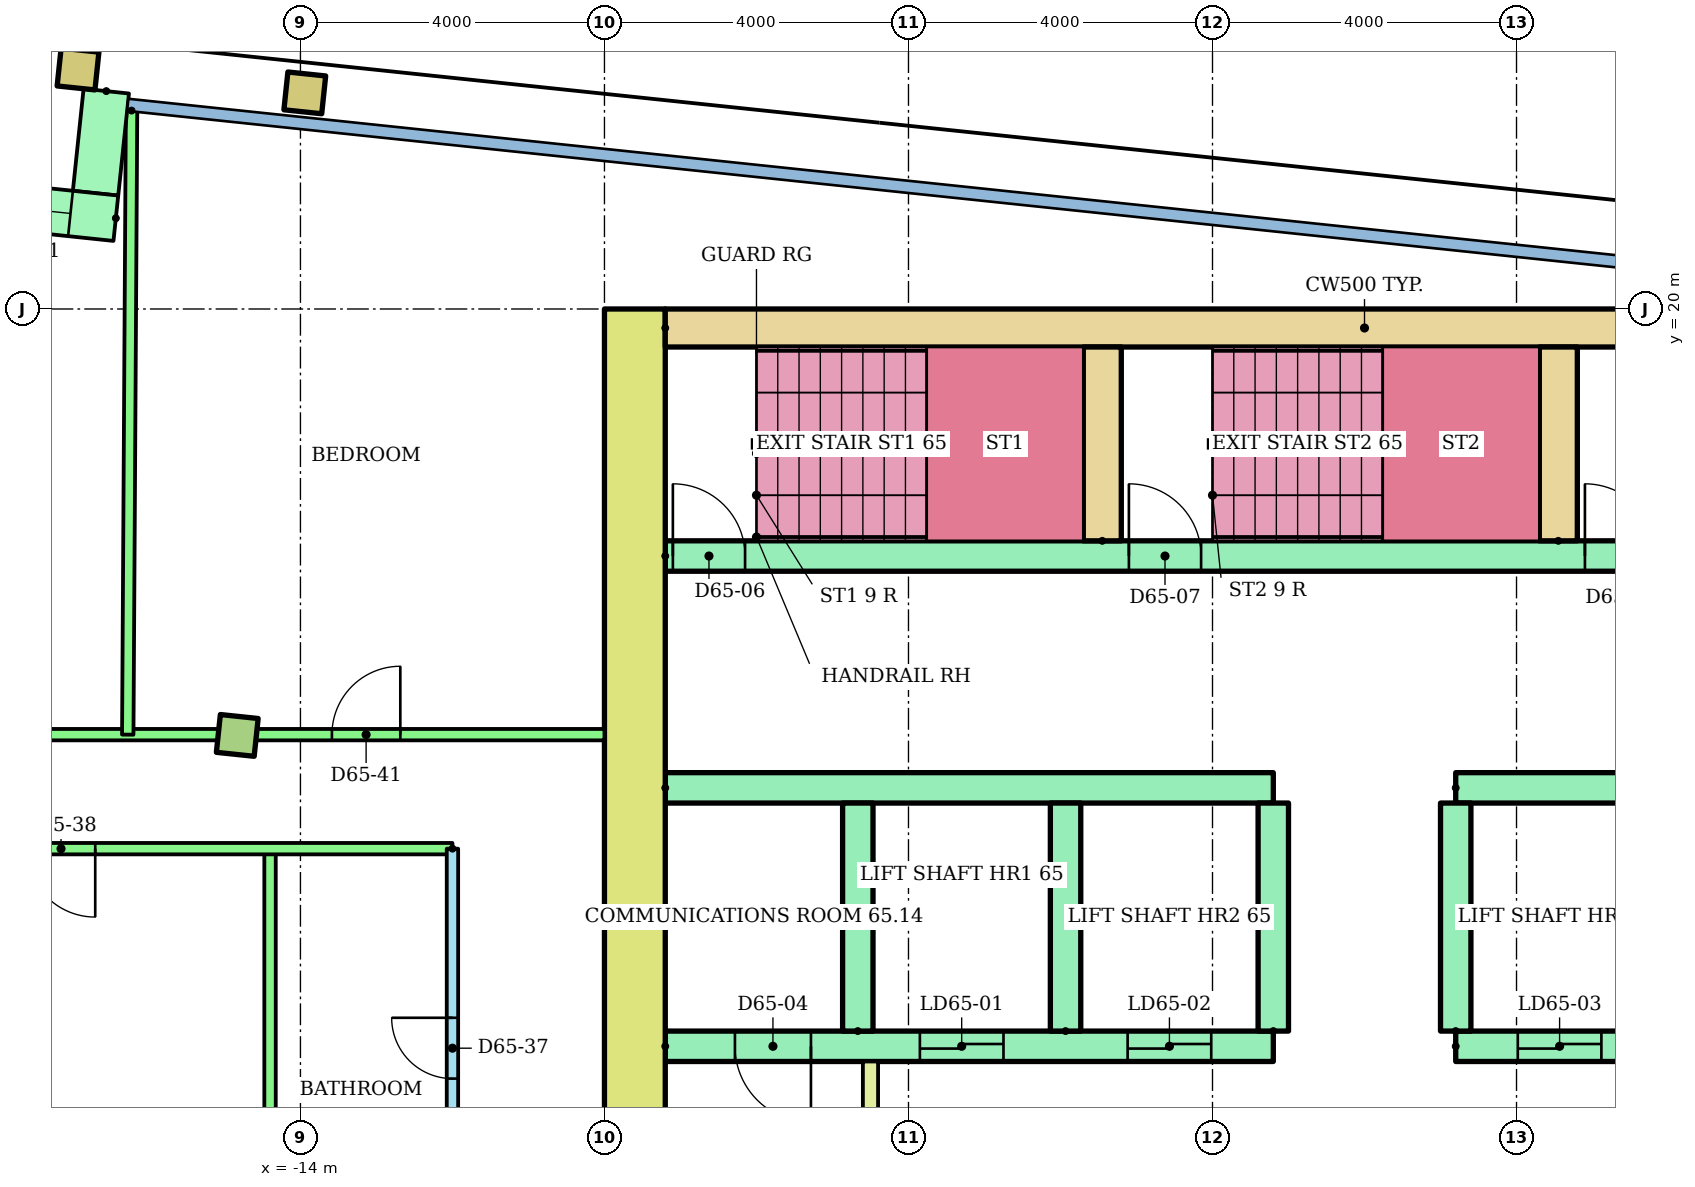
"""IFC4 building model, lengths in metres.
Left out: names, types, materials, properties, quantities, classifications, styles, units other than length and angle.
Written with IfcOpenShell. Run it as: python <this file> out.ifc"""

import sys

from ifc_helpers import new_model, si_unit, direction, frame, frame_2d, origin, origin_2d, place, context, subcontext, project, spatial, rectangle, hollow_rectangle, extrude, element, fill, save


model = new_model("IFC4")
c1 = context("Model", 3, precision=1e-05, world=origin(), true_north=direction((0.0, 1.0)))
c2 = subcontext(c1, "Body", "Model", "MODEL_VIEW")
j1 = project(units=[si_unit("LENGTHUNIT", "METRE"), si_unit("PLANEANGLEUNIT", "RADIAN")], contexts=[c1])
p1 = place(None, origin())
s1 = spatial("IfcSite", under=j1, at=p1, CompositionType="ELEMENT")
p2 = place(p1, origin())
s2 = spatial("IfcBuilding", under=s1, at=p2, CompositionType="ELEMENT")
p3 = place(p2, frame((0.0, 0.0, 253.1)))
s3 = spatial("IfcBuildingStorey", under=s2, at=p3, CompositionType="ELEMENT", Elevation=253.1)
p4 = place(p3, frame((-14.831, 14.39, 0.0), z_axis=(0.0, 0.0, 1.0), x_axis=(0.994521895368, -0.104528463268, 0.0)))
e1 = element("IfcColumn", 1, at=p4, inside=s3, PredefinedType="COLUMN", context=c2, shape_type="SweptSolid", body=[
    extrude(rectangle(XDim=0.5, YDim=0.5, at=origin_2d()), origin(), (0.0, 0.0, 1.0), 3.2),
])
for number, where, z_axis, x_axis in (
    (2, (-16.926, 23.157, 0.0), (0.0, 0.0, 1.0), (0.995, -0.105, 0.0)),
    (3, (-13.943, 22.843, 0.0), (0.0, 0.0, 1.0), (0.995, -0.105, 0.0)),
):
    element("IfcColumn", number, at=place(p3, frame(where, z_axis=z_axis, x_axis=x_axis)), inside=s3, PredefinedType="COLUMN", context=c2, shape_type="SweptSolid", body=[
        extrude(hollow_rectangle(XDim=0.5, YDim=0.5, WallThickness=0.025, at=origin_2d()), origin(), (0.0, 0.0, 1.0), 3.2),
    ])
p5 = place(p3, frame((-16.555, 22.866, 0.0), z_axis=(0.0, 0.0, 1.0), x_axis=(-0.104515354875, -0.994523273029, 0.0)))
e4 = element("IfcWall", 4, at=p5, inside=s3, PredefinedType="STANDARD", context=c2, shape_type="SweptSolid", body=[
    extrude(rectangle(XDim=1.35, YDim=0.6, at=frame_2d((0.675, 0.0))), origin(), (0.0, 0.0, 1.0), 2.92),
])
p6 = place(p3, frame((-16.429, 21.194, 0.0), z_axis=(0.0, 0.0, 1.0), x_axis=(-0.994522640205, 0.104521376379, 0.0)))
e5 = element("IfcWall", 5, at=p6, inside=s3, PredefinedType="STANDARD", context=c2, shape_type="SweptSolid", body=[
    extrude(rectangle(XDim=2.1, YDim=0.6, at=frame_2d((1.05, 0.0))), origin(), (0.0, 0.0, 1.0), 2.92),
])
p7 = place(p6, frame((0.6, 0.0, 0.9)))
e6 = element("IfcOpeningElement", 6, at=p7, cuts=e5, PredefinedType="OPENING", context=c2, shape_type="SweptSolid", body=[
    extrude(rectangle(XDim=0.9, YDim=1.5, at=frame_2d((0.45, 0.75))), frame((0.0, 0.31, 0.0), z_axis=(0.0, -1.0, 0.0), x_axis=(1.0, 0.0, 0.0)), (0.0, 0.0, 1.0), 0.62),
])
p8 = place(p3, frame((-9.6, 6.4, 0.0), z_axis=(0.0, 0.0, 1.0), x_axis=(0.0, 1.0, 0.0)))
e7 = element("IfcWall", 7, at=p8, inside=s3, PredefinedType="SHEAR", context=c2, shape_type="SweptSolid", body=[
    extrude(rectangle(XDim=13.6, YDim=0.8, at=frame_2d((6.8, 0.0))), origin(), (0.0, 0.0, 1.0), 2.92),
])
p9 = place(p3, frame((-9.2, 19.75, 0.0)))
e8 = element("IfcWall", 8, at=p9, inside=s3, PredefinedType="SHEAR", context=c2, shape_type="SweptSolid", body=[
    extrude(rectangle(XDim=18.4, YDim=0.5, at=frame_2d((9.2, 0.0))), origin(), (0.0, 0.0, 1.0), 2.92),
])
p10 = place(p3, frame((-9.2, 10.3, 0.0)))
e9 = element("IfcWall", 9, at=p10, inside=s3, PredefinedType="SHEAR", context=c2, shape_type="SweptSolid", body=[
    extrude(rectangle(XDim=8.0, YDim=0.4, at=frame_2d((4.0, 0.0))), origin(), (0.0, 0.0, 1.0), 2.92),
])
p11 = place(p10, frame((3.35, 0.0, 0.0)))
e10 = element("IfcOpeningElement", 10, at=p11, cuts=e9, PredefinedType="OPENING", context=c2, shape_type="SweptSolid", body=[
    extrude(rectangle(XDim=1.1, YDim=2.1, at=frame_2d((0.55, 1.05))), frame((0.0, 0.21, 0.0), z_axis=(0.0, -1.0, 0.0), x_axis=(1.0, 0.0, 0.0)), (0.0, 0.0, 1.0), 0.42),
])
p12 = place(p10, frame((6.083, 0.0, 0.0)))
e11 = element("IfcOpeningElement", 11, at=p12, cuts=e9, PredefinedType="OPENING", context=c2, shape_type="SweptSolid", body=[
    extrude(rectangle(XDim=1.1, YDim=2.1, at=frame_2d((0.55, 1.05))), frame((0.0, 0.21, 0.0), z_axis=(0.0, -1.0, 0.0), x_axis=(1.0, 0.0, 0.0)), (0.0, 0.0, 1.0), 0.42),
])
p13 = place(p10, frame((0.917, 0.0, 0.0)))
e12 = element("IfcOpeningElement", 12, at=p13, cuts=e9, PredefinedType="OPENING", context=c2, shape_type="SweptSolid", body=[
    extrude(rectangle(XDim=1.0, YDim=2.1, at=frame_2d((0.5, 1.05))), frame((0.0, 0.21, 0.0), z_axis=(0.0, -1.0, 0.0), x_axis=(1.0, 0.0, 0.0)), (0.0, 0.0, 1.0), 0.42),
])
p14 = place(p3, frame((-9.2, 13.7, 0.0)))
e13 = element("IfcWall", 13, at=p14, inside=s3, PredefinedType="SHEAR", context=c2, shape_type="SweptSolid", body=[
    extrude(rectangle(XDim=8.0, YDim=0.4, at=frame_2d((4.0, 0.0))), origin(), (0.0, 0.0, 1.0), 2.92),
])
p15 = place(p3, frame((1.2, 10.3, 0.0)))
e14 = element("IfcWall", 14, at=p15, inside=s3, PredefinedType="SHEAR", context=c2, shape_type="SweptSolid", body=[
    extrude(rectangle(XDim=8.0, YDim=0.4, at=frame_2d((4.0, 0.0))), origin(), (0.0, 0.0, 1.0), 2.92),
])
p16 = place(p15, frame((0.817, 0.0, 0.0)))
e15 = element("IfcOpeningElement", 15, at=p16, cuts=e14, PredefinedType="OPENING", context=c2, shape_type="SweptSolid", body=[
    extrude(rectangle(XDim=1.1, YDim=2.1, at=frame_2d((0.55, 1.05))), frame((0.0, 0.21, 0.0), z_axis=(0.0, -1.0, 0.0), x_axis=(1.0, 0.0, 0.0)), (0.0, 0.0, 1.0), 0.42),
])
p17 = place(p15, frame((3.55, 0.0, 0.0)))
e16 = element("IfcOpeningElement", 16, at=p17, cuts=e14, PredefinedType="OPENING", context=c2, shape_type="SweptSolid", body=[
    extrude(rectangle(XDim=1.1, YDim=2.1, at=frame_2d((0.55, 1.05))), frame((0.0, 0.21, 0.0), z_axis=(0.0, -1.0, 0.0), x_axis=(1.0, 0.0, 0.0)), (0.0, 0.0, 1.0), 0.42),
])
p18 = place(p15, frame((6.283, 0.0, 0.0)))
e17 = element("IfcOpeningElement", 17, at=p18, cuts=e14, PredefinedType="OPENING", context=c2, shape_type="SweptSolid", body=[
    extrude(rectangle(XDim=1.1, YDim=2.1, at=frame_2d((0.55, 1.05))), frame((0.0, 0.21, 0.0), z_axis=(0.0, -1.0, 0.0), x_axis=(1.0, 0.0, 0.0)), (0.0, 0.0, 1.0), 0.42),
])
p19 = place(p3, frame((1.2, 13.7, 0.0)))
e18 = element("IfcWall", 18, at=p19, inside=s3, PredefinedType="SHEAR", context=c2, shape_type="SweptSolid", body=[
    extrude(rectangle(XDim=8.0, YDim=0.4, at=frame_2d((4.0, 0.0))), origin(), (0.0, 0.0, 1.0), 2.92),
])
for number, where, z_axis, x_axis in (
    (19, (-6.667, 10.5, 0.0), (0.0, 0.0, 1.0), (0.0, 1.0, 0.0)),
    (20, (-3.933, 10.5, 0.0), (0.0, 0.0, 1.0), (0.0, 1.0, 0.0)),
    (21, (-1.2, 10.5, 0.0), (0.0, 0.0, 1.0), (0.0, 1.0, 0.0)),
    (22, (1.2, 10.5, 0.0), (0.0, 0.0, 1.0), (0.0, 1.0, 0.0)),
):
    element("IfcWall", number, at=place(p3, frame(where, z_axis=z_axis, x_axis=x_axis)), inside=s3, PredefinedType="SHEAR", context=c2, shape_type="SweptSolid", body=[
        extrude(rectangle(XDim=3.0, YDim=0.4, at=frame_2d((1.5, 0.0))), origin(), (0.0, 0.0, 1.0), 2.92),
    ])
p20 = place(p3, frame((-9.2, 16.75, 0.0)))
e23 = element("IfcWall", 23, at=p20, inside=s3, PredefinedType="SHEAR", context=c2, shape_type="SweptSolid", body=[
    extrude(rectangle(XDim=18.4, YDim=0.4, at=frame_2d((9.2, 0.0))), origin(), (0.0, 0.0, 1.0), 2.92),
])
p21 = place(p20, frame((0.1, 0.0, 0.0)))
e24 = element("IfcOpeningElement", 24, at=p21, cuts=e23, PredefinedType="OPENING", context=c2, shape_type="SweptSolid", body=[
    extrude(rectangle(XDim=0.95, YDim=2.1, at=frame_2d((0.475, 1.05))), frame((0.0, 0.21, 0.0), z_axis=(0.0, -1.0, 0.0), x_axis=(1.0, 0.0, 0.0)), (0.0, 0.0, 1.0), 0.42),
])
p22 = place(p20, frame((6.1, 0.0, 0.0)))
e25 = element("IfcOpeningElement", 25, at=p22, cuts=e23, PredefinedType="OPENING", context=c2, shape_type="SweptSolid", body=[
    extrude(rectangle(XDim=0.95, YDim=2.1, at=frame_2d((0.475, 1.05))), frame((0.0, 0.21, 0.0), z_axis=(0.0, -1.0, 0.0), x_axis=(1.0, 0.0, 0.0)), (0.0, 0.0, 1.0), 0.42),
])
p23 = place(p20, frame((12.1, 0.0, 0.0)))
e26 = element("IfcOpeningElement", 26, at=p23, cuts=e23, PredefinedType="OPENING", context=c2, shape_type="SweptSolid", body=[
    extrude(rectangle(XDim=0.95, YDim=2.1, at=frame_2d((0.475, 1.05))), frame((0.0, 0.21, 0.0), z_axis=(0.0, -1.0, 0.0), x_axis=(1.0, 0.0, 0.0)), (0.0, 0.0, 1.0), 0.42),
])
for number, where, z_axis, x_axis in (
    (27, (-3.45, 16.95, 0.0), (0.0, 0.0, 1.0), (0.0, 1.0, 0.0)),
    (28, (2.55, 16.95, 0.0), (0.0, 0.0, 1.0), (0.0, 1.0, 0.0)),
):
    element("IfcWall", number, at=place(p3, frame(where, z_axis=z_axis, x_axis=x_axis)), inside=s3, PredefinedType="SHEAR", context=c2, shape_type="SweptSolid", body=[
        extrude(rectangle(XDim=2.55, YDim=0.5, at=frame_2d((1.275, 0.0))), origin(), (0.0, 0.0, 1.0), 2.92),
    ])
p24 = place(p3, frame((-6.5, 6.8, 0.0), z_axis=(0.0, 0.0, 1.0), x_axis=(0.0, 1.0, 0.0)))
e29 = element("IfcWall", 29, at=p24, inside=s3, PredefinedType="PARTITIONING", context=c2, shape_type="SweptSolid", body=[
    extrude(rectangle(XDim=3.3, YDim=0.2, at=frame_2d((1.65, 0.0))), origin(), (0.0, 0.0, 1.0), 2.92),
])
p25 = place(p24, frame((1.15, 0.0, 0.0)))
e30 = element("IfcOpeningElement", 30, at=p25, cuts=e29, PredefinedType="OPENING", context=c2, shape_type="SweptSolid", body=[
    extrude(rectangle(XDim=1.0, YDim=2.1, at=frame_2d((0.5, 1.05))), frame((0.0, 0.11, 0.0), z_axis=(0.0, -1.0, 0.0), x_axis=(1.0, 0.0, 0.0)), (0.0, 0.0, 1.0), 0.22),
])
p26 = place(p3, frame((-12.0, 1.4, 0.0), z_axis=(0.0, 0.0, 1.0), x_axis=(0.0, 1.0, 0.0)))
e31 = element("IfcWall", 31, at=p26, inside=s3, PredefinedType="PARTITIONING", context=c2, shape_type="SweptSolid", body=[
    extrude(rectangle(XDim=11.5, YDim=0.15, at=frame_2d((5.75, 0.0))), origin(), (0.0, 0.0, 1.0), 2.4),
])
p27 = place(p26, frame((2.675, 0.0, 0.0)))
e32 = element("IfcOpeningElement", 32, at=p27, cuts=e31, PredefinedType="OPENING", context=c2, shape_type="SweptSolid", body=[
    extrude(rectangle(XDim=0.9, YDim=2.1, at=frame_2d((0.45, 1.05))), frame((0.0, 0.085, 0.0), z_axis=(0.0, -1.0, 0.0), x_axis=(1.0, 0.0, 0.0)), (0.0, 0.0, 1.0), 0.17),
])
p28 = place(p26, frame((8.475, 0.0, 0.0)))
e33 = element("IfcOpeningElement", 33, at=p28, cuts=e31, PredefinedType="OPENING", context=c2, shape_type="SweptSolid", body=[
    extrude(rectangle(XDim=0.8, YDim=2.1, at=frame_2d((0.4, 1.05))), frame((0.0, 0.085, 0.0), z_axis=(0.0, -1.0, 0.0), x_axis=(1.0, 0.0, 0.0)), (0.0, 0.0, 1.0), 0.17),
])
p29 = place(p3, frame((-14.4, 1.4, 0.0), z_axis=(0.0, 0.0, 1.0), x_axis=(0.0, 1.0, 0.0)))
e34 = element("IfcWall", 34, at=p29, inside=s3, PredefinedType="PARTITIONING", context=c2, shape_type="SweptSolid", body=[
    extrude(rectangle(XDim=11.5, YDim=0.15, at=frame_2d((5.75, 0.0))), origin(), (0.0, 0.0, 1.0), 2.4),
])
p30 = place(p3, frame((-12.0, 12.9, 0.0), z_axis=(0.0, 0.0, 1.0), x_axis=(-1.0, 0.0, 0.0)))
e35 = element("IfcWall", 35, at=p30, inside=s3, PredefinedType="PARTITIONING", context=c2, shape_type="SweptSolid", body=[
    extrude(rectangle(XDim=10.047, YDim=0.15, at=frame_2d((5.024, 0.0))), origin(), (0.0, 0.0, 1.0), 2.4),
])
p31 = place(p30, frame((4.7, 0.0, 0.0)))
e36 = element("IfcOpeningElement", 36, at=p31, cuts=e35, PredefinedType="OPENING", context=c2, shape_type="SweptSolid", body=[
    extrude(rectangle(XDim=0.9, YDim=2.1, at=frame_2d((0.45, 1.05))), frame((0.0, 0.085, 0.0), z_axis=(0.0, -1.0, 0.0), x_axis=(1.0, 0.0, 0.0)), (0.0, 0.0, 1.0), 0.17),
])
p32 = place(p30, frame((9.047, 0.0, 0.0)))
e37 = element("IfcOpeningElement", 37, at=p32, cuts=e35, PredefinedType="OPENING", context=c2, shape_type="SweptSolid", body=[
    extrude(rectangle(XDim=0.9, YDim=2.1, at=frame_2d((0.45, 1.05))), frame((0.0, 0.085, 0.0), z_axis=(0.0, -1.0, 0.0), x_axis=(1.0, 0.0, 0.0)), (0.0, 0.0, 1.0), 0.17),
])
p33 = place(p3, frame((-21.89, 14.4, 0.0)))
e38 = element("IfcWall", 38, at=p33, inside=s3, PredefinedType="PARTITIONING", context=c2, shape_type="SweptSolid", body=[
    extrude(rectangle(XDim=11.89, YDim=0.15, at=frame_2d((5.945, 0.0))), origin(), (0.0, 0.0, 1.0), 2.4),
])
p34 = place(p33, frame((1.26, 0.0, 0.0)))
e39 = element("IfcOpeningElement", 39, at=p34, cuts=e38, PredefinedType="OPENING", context=c2, shape_type="SweptSolid", body=[
    extrude(rectangle(XDim=1.0, YDim=2.1, at=frame_2d((0.5, 1.05))), frame((0.0, 0.085, 0.0), z_axis=(0.0, -1.0, 0.0), x_axis=(1.0, 0.0, 0.0)), (0.0, 0.0, 1.0), 0.17),
])
p35 = place(p33, frame((8.304, 0.0, 0.0)))
e40 = element("IfcOpeningElement", 40, at=p35, cuts=e38, PredefinedType="OPENING", context=c2, shape_type="SweptSolid", body=[
    extrude(rectangle(XDim=0.9, YDim=2.1, at=frame_2d((0.45, 1.05))), frame((0.0, 0.085, 0.0), z_axis=(0.0, -1.0, 0.0), x_axis=(1.0, 0.0, 0.0)), (0.0, 0.0, 1.0), 0.17),
])
p36 = place(p3, frame((-16.222, 22.61, 0.0), z_axis=(0.0, 0.0, 1.0), x_axis=(-0.006095634594, -0.999981421447, 0.0)))
e41 = element("IfcWall", 41, at=p36, inside=s3, PredefinedType="PARTITIONING", context=c2, shape_type="SweptSolid", body=[
    extrude(rectangle(XDim=8.211, YDim=0.15, at=frame_2d((4.105, 0.0))), origin(), (0.0, 0.0, 1.0), 2.4),
])
p37 = place(p7, origin())
e42 = element("IfcWindow", 42, at=p37, inside=s3, PartitioningType="SINGLE_PANEL", PredefinedType="WINDOW", context=c2, shape_type="SweptSolid", body=[
    extrude(rectangle(XDim=0.9, YDim=1.5, at=frame_2d((0.45, 0.75))), frame((0.0, 0.03, 0.0), z_axis=(0.0, -1.0, 0.0), x_axis=(1.0, 0.0, 0.0)), (0.0, 0.0, 1.0), 0.06),
])
fill(e6, e42)
p38 = place(p11, origin())
e43 = element("IfcDoor", 43, at=p38, inside=s3, OperationType="SLIDING_TO_LEFT", PredefinedType="DOOR", context=c2, shape_type="SweptSolid", body=[
    extrude(rectangle(XDim=1.1, YDim=2.1, at=frame_2d((0.55, 1.05))), frame((0.0, 0.025, 0.0), z_axis=(0.0, -1.0, 0.0), x_axis=(1.0, 0.0, 0.0)), (0.0, 0.0, 1.0), 0.05),
])
fill(e10, e43)
p39 = place(p12, origin())
e44 = element("IfcDoor", 44, at=p39, inside=s3, OperationType="SLIDING_TO_LEFT", PredefinedType="DOOR", context=c2, shape_type="SweptSolid", body=[
    extrude(rectangle(XDim=1.1, YDim=2.1, at=frame_2d((0.55, 1.05))), frame((0.0, 0.025, 0.0), z_axis=(0.0, -1.0, 0.0), x_axis=(1.0, 0.0, 0.0)), (0.0, 0.0, 1.0), 0.05),
])
fill(e11, e44)
p40 = place(p16, origin())
e45 = element("IfcDoor", 45, at=p40, inside=s3, OperationType="SLIDING_TO_LEFT", PredefinedType="DOOR", context=c2, shape_type="SweptSolid", body=[
    extrude(rectangle(XDim=1.1, YDim=2.1, at=frame_2d((0.55, 1.05))), frame((0.0, 0.025, 0.0), z_axis=(0.0, -1.0, 0.0), x_axis=(1.0, 0.0, 0.0)), (0.0, 0.0, 1.0), 0.05),
])
fill(e15, e45)
p41 = place(p13, frame((1.0, 0.0, 0.0), z_axis=(0.0, 0.0, 1.0), x_axis=(-1.0, 0.0, 0.0)))
e46 = element("IfcDoor", 46, at=p41, inside=s3, OperationType="SINGLE_SWING_RIGHT", PredefinedType="DOOR", context=c2, shape_type="SweptSolid", body=[
    extrude(rectangle(XDim=1.0, YDim=2.1, at=frame_2d((0.5, 1.05))), frame((0.0, 0.025, 0.0), z_axis=(0.0, -1.0, 0.0), x_axis=(1.0, 0.0, 0.0)), (0.0, 0.0, 1.0), 0.05),
])
fill(e12, e46)
p42 = place(p21, origin())
e47 = element("IfcDoor", 47, at=p42, inside=s3, OperationType="SINGLE_SWING_LEFT", PredefinedType="DOOR", context=c2, shape_type="SweptSolid", body=[
    extrude(rectangle(XDim=0.95, YDim=2.1, at=frame_2d((0.475, 1.05))), frame((0.0, 0.025, 0.0), z_axis=(0.0, -1.0, 0.0), x_axis=(1.0, 0.0, 0.0)), (0.0, 0.0, 1.0), 0.05),
])
fill(e24, e47)
p43 = place(p22, origin())
e48 = element("IfcDoor", 48, at=p43, inside=s3, OperationType="SINGLE_SWING_LEFT", PredefinedType="DOOR", context=c2, shape_type="SweptSolid", body=[
    extrude(rectangle(XDim=0.95, YDim=2.1, at=frame_2d((0.475, 1.05))), frame((0.0, 0.025, 0.0), z_axis=(0.0, -1.0, 0.0), x_axis=(1.0, 0.0, 0.0)), (0.0, 0.0, 1.0), 0.05),
])
fill(e25, e48)
p44 = place(p23, origin())
e49 = element("IfcDoor", 49, at=p44, inside=s3, OperationType="SINGLE_SWING_LEFT", PredefinedType="DOOR", context=c2, shape_type="SweptSolid", body=[
    extrude(rectangle(XDim=0.95, YDim=2.1, at=frame_2d((0.475, 1.05))), frame((0.0, 0.025, 0.0), z_axis=(0.0, -1.0, 0.0), x_axis=(1.0, 0.0, 0.0)), (0.0, 0.0, 1.0), 0.05),
])
fill(e26, e49)
p45 = place(p28, origin())
e50 = element("IfcDoor", 50, at=p45, inside=s3, OperationType="SINGLE_SWING_RIGHT", PredefinedType="DOOR", context=c2, shape_type="SweptSolid", body=[
    extrude(rectangle(XDim=0.8, YDim=2.1, at=frame_2d((0.4, 1.05))), frame((0.0, 0.025, 0.0), z_axis=(0.0, -1.0, 0.0), x_axis=(1.0, 0.0, 0.0)), (0.0, 0.0, 1.0), 0.05),
])
fill(e33, e50)
p46 = place(p31, origin())
e51 = element("IfcDoor", 51, at=p46, inside=s3, OperationType="SINGLE_SWING_LEFT", PredefinedType="DOOR", context=c2, shape_type="SweptSolid", body=[
    extrude(rectangle(XDim=0.9, YDim=2.1, at=frame_2d((0.45, 1.05))), frame((0.0, 0.025, 0.0), z_axis=(0.0, -1.0, 0.0), x_axis=(1.0, 0.0, 0.0)), (0.0, 0.0, 1.0), 0.05),
])
fill(e36, e51)
p47 = place(p35, origin())
e52 = element("IfcDoor", 52, at=p47, inside=s3, OperationType="SINGLE_SWING_RIGHT", PredefinedType="DOOR", context=c2, shape_type="SweptSolid", body=[
    extrude(rectangle(XDim=0.9, YDim=2.1, at=frame_2d((0.45, 1.05))), frame((0.0, 0.025, 0.0), z_axis=(0.0, -1.0, 0.0), x_axis=(1.0, 0.0, 0.0)), (0.0, 0.0, 1.0), 0.05),
])
fill(e40, e52)
save(model, sys.argv[1])
